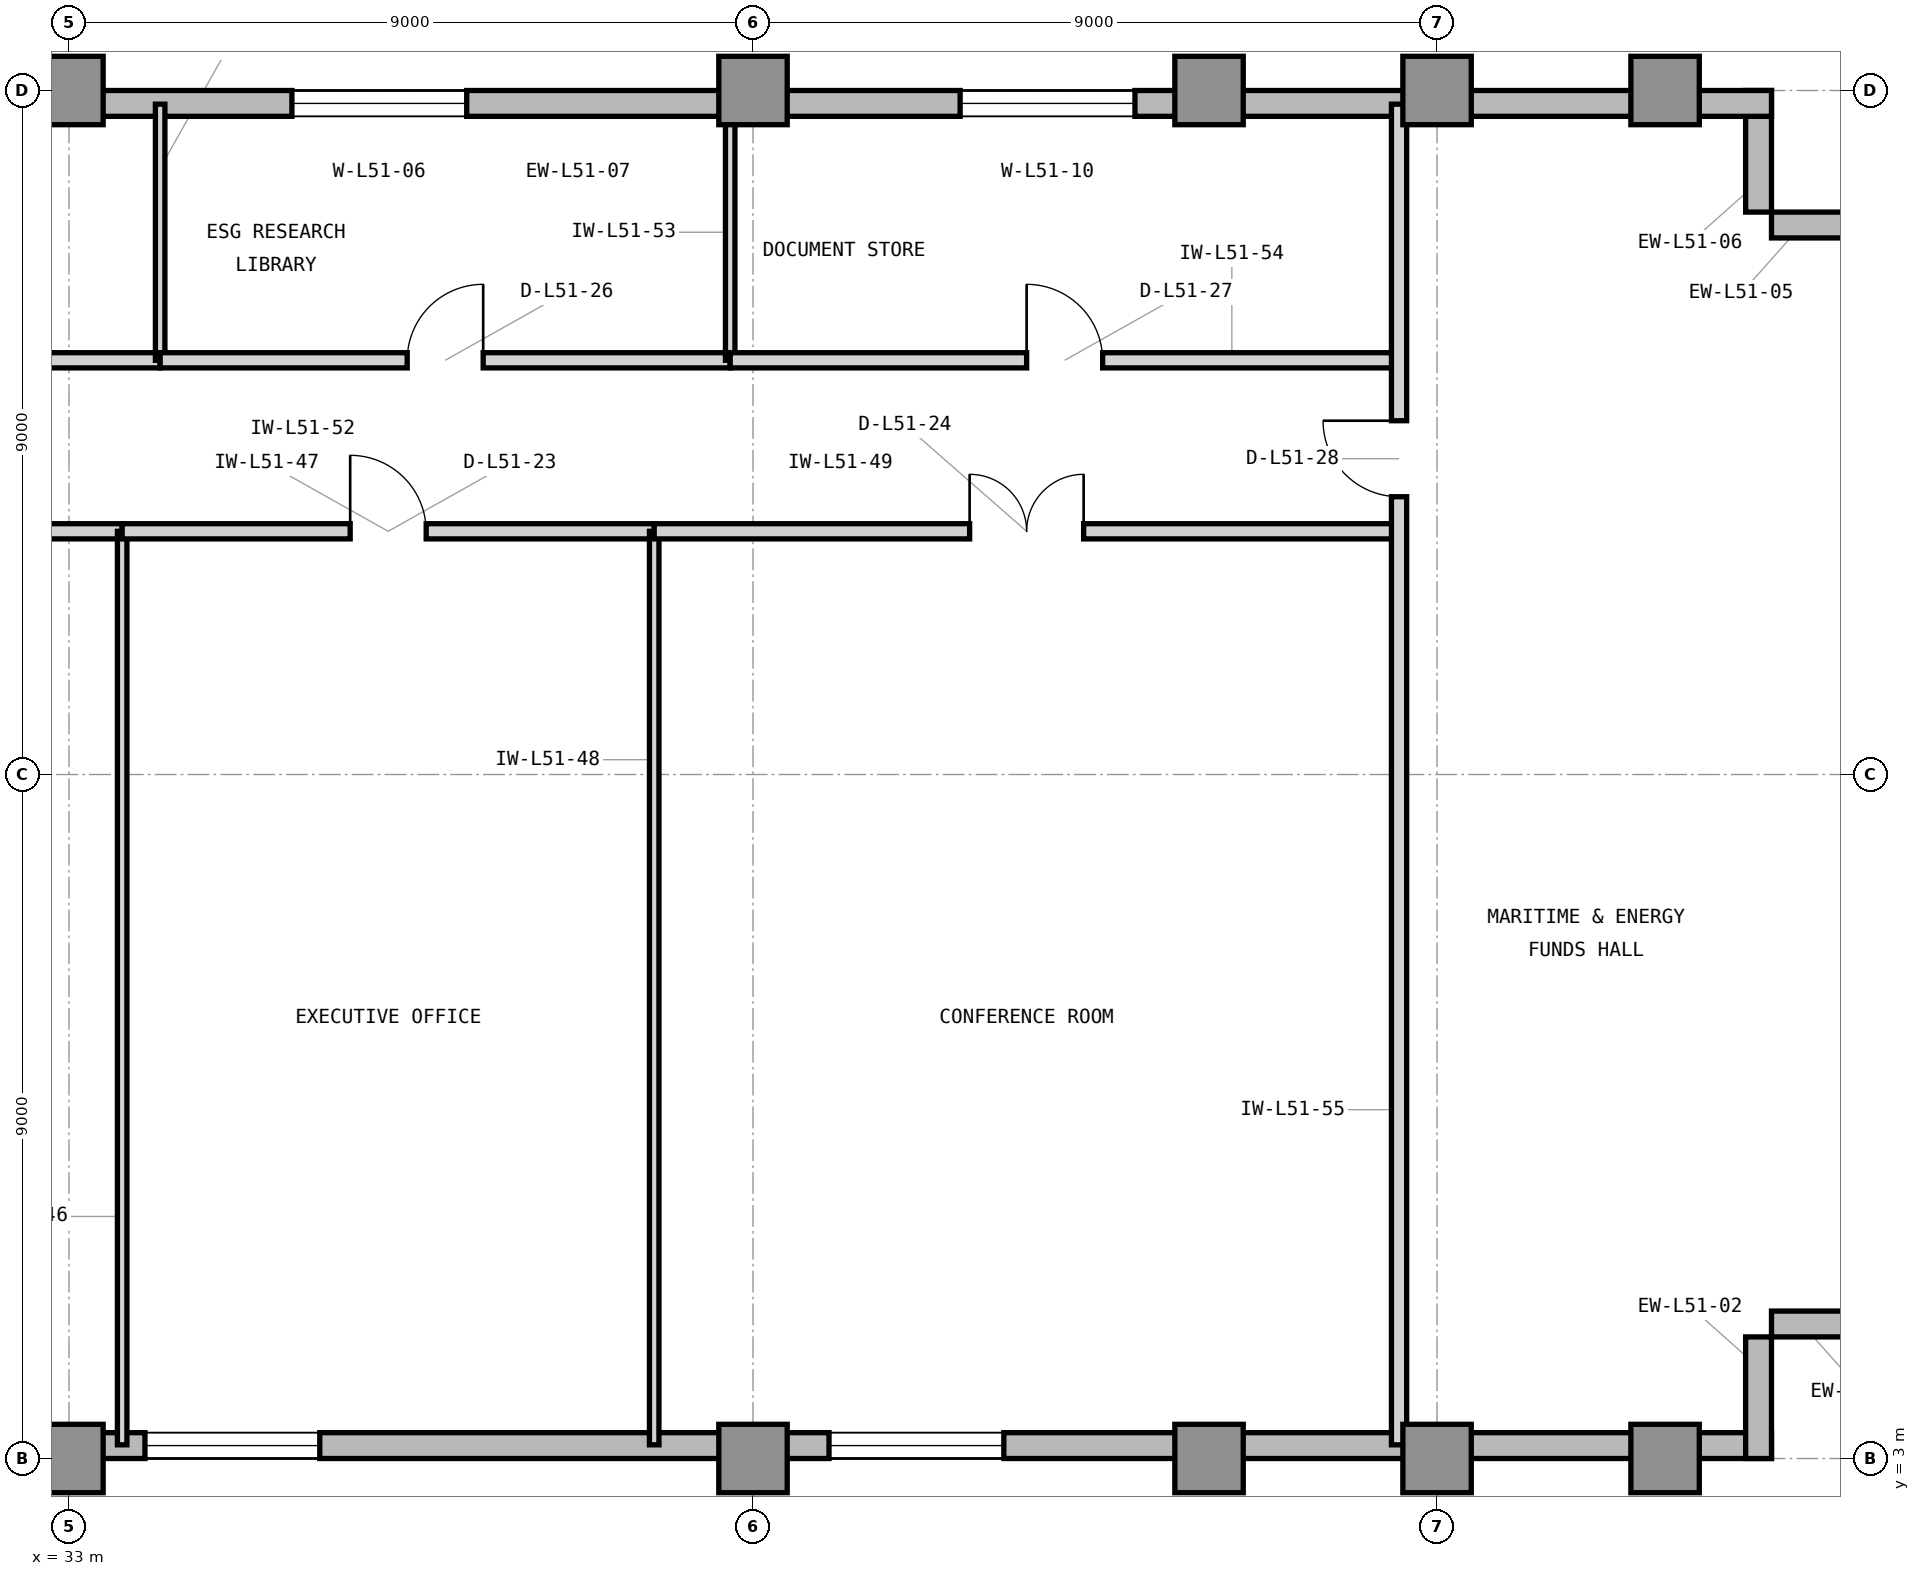
"""IFC4 building model, lengths in metres.
Left out: names, types, materials, properties, quantities, classifications, styles, units other than length and angle.
Written with IfcOpenShell. Run it as: python <this file> out.ifc"""

import sys

from ifc_helpers import new_model, si_unit, direction, frame, frame_2d, origin, origin_2d, place, context, subcontext, project, spatial, rectangle, extrude, element, fill, save


model = new_model("IFC4")
c1 = context("Model", 3, precision=1e-05, world=origin(), true_north=direction((0.0, 1.0)))
c2 = subcontext(c1, "Body", "Model", "MODEL_VIEW")
j1 = project(units=[si_unit("LENGTHUNIT", "METRE"), si_unit("PLANEANGLEUNIT", "RADIAN")], contexts=[c1])
p1 = place(None, origin())
s1 = spatial("IfcSite", under=j1, at=p1, CompositionType="ELEMENT")
p2 = place(p1, origin())
s2 = spatial("IfcBuilding", under=s1, at=p2, CompositionType="ELEMENT")
p3 = place(p2, frame((0.0, 0.0, 211.2)))
s3 = spatial("IfcBuildingStorey", under=s2, at=p3, CompositionType="ELEMENT", Elevation=211.2)
for number, where, z_axis, x_axis in (
    (1, (33.0, 3.0, 0.0), (0.0, 0.0, 1.0), (1.0, 0.0, 0.0)),
    (2, (33.0, 21.0, 0.0), (0.0, 0.0, 1.0), (1.0, 0.0, 0.0)),
    (3, (42.0, 3.0, 0.0), (0.0, 0.0, 1.0), (1.0, 0.0, 0.0)),
    (4, (42.0, 21.0, 0.0), (0.0, 0.0, 1.0), (1.0, 0.0, 0.0)),
    (5, (48.0, 3.0, 0.0), (0.0, 0.0, 1.0), (1.0, 0.0, 0.0)),
    (6, (48.0, 21.0, 0.0), (0.0, 0.0, 1.0), (1.0, 0.0, 0.0)),
    (7, (51.0, 3.0, 0.0), (0.0, 0.0, 1.0), (1.0, 0.0, 0.0)),
    (8, (51.0, 21.0, 0.0), (0.0, 0.0, 1.0), (1.0, 0.0, 0.0)),
    (9, (54.0, 3.0, 0.0), (0.0, 0.0, 1.0), (1.0, 0.0, 0.0)),
    (10, (54.0, 21.0, 0.0), (0.0, 0.0, 1.0), (1.0, 0.0, 0.0)),
):
    element("IfcColumn", number, at=place(p3, frame(where, z_axis=z_axis, x_axis=x_axis)), inside=s3, PredefinedType="COLUMN", context=c2, shape_type="SweptSolid", body=[
        extrude(rectangle(XDim=0.9, YDim=0.9, at=origin_2d()), origin(), (0.0, 0.0, 1.0), 3.9),
    ])
p4 = place(p3, frame((23.9, 3.17, 0.0), z_axis=(0.0, 0.0, 1.0), x_axis=(1.0, 0.0, 0.0)))
e11 = element("IfcWall", 11, at=p4, inside=s3, PredefinedType="STANDARD", context=c2, shape_type="SweptSolid", body=[
    extrude(rectangle(XDim=31.5, YDim=0.34, at=frame_2d((15.75, 0.0))), origin(), (0.0, 0.0, 1.0), 3.7),
])
p5 = place(p4, frame((5.6, 0.0, 0.9)))
e12 = element("IfcOpeningElement", 12, at=p5, cuts=e11, PredefinedType="OPENING", context=c2, shape_type="SweptSolid", body=[
    extrude(rectangle(XDim=2.3, YDim=2.2, at=frame_2d((1.15, 1.1))), frame((0.0, 0.18, 0.0), z_axis=(0.0, -1.0, 0.0), x_axis=(1.0, 0.0, 0.0)), (0.0, 0.0, 1.0), 0.36),
])
p6 = place(p4, frame((10.1, 0.0, 0.9)))
e13 = element("IfcOpeningElement", 13, at=p6, cuts=e11, PredefinedType="OPENING", context=c2, shape_type="SweptSolid", body=[
    extrude(rectangle(XDim=2.3, YDim=2.2, at=frame_2d((1.15, 1.1))), frame((0.0, 0.18, 0.0), z_axis=(0.0, -1.0, 0.0), x_axis=(1.0, 0.0, 0.0)), (0.0, 0.0, 1.0), 0.36),
])
p7 = place(p4, frame((19.1, 0.0, 0.9)))
e14 = element("IfcOpeningElement", 14, at=p7, cuts=e11, PredefinedType="OPENING", context=c2, shape_type="SweptSolid", body=[
    extrude(rectangle(XDim=2.3, YDim=2.2, at=frame_2d((1.15, 1.1))), frame((0.0, 0.18, 0.0), z_axis=(0.0, -1.0, 0.0), x_axis=(1.0, 0.0, 0.0)), (0.0, 0.0, 1.0), 0.36),
])
p8 = place(p4, frame((0.9, 0.0, 0.9)))
e15 = element("IfcOpeningElement", 15, at=p8, cuts=e11, PredefinedType="OPENING", context=c2, shape_type="SweptSolid", body=[
    extrude(rectangle(XDim=1.6, YDim=2.2, at=frame_2d((0.8, 1.1))), frame((0.0, 0.18, 0.0), z_axis=(0.0, -1.0, 0.0), x_axis=(1.0, 0.0, 0.0)), (0.0, 0.0, 1.0), 0.36),
])
for number, where, z_axis, x_axis in (
    (16, (55.23, 3.0, 0.0), (0.0, 0.0, 1.0), (0.0, 1.0, 0.0)),
    (17, (55.4, 4.77, 0.0), (0.0, 0.0, 1.0), (1.0, 0.0, 0.0)),
    (18, (57.0, 19.23, 0.0), (0.0, 0.0, 1.0), (-1.0, 0.0, 0.0)),
    (19, (55.23, 19.4, 0.0), (0.0, 0.0, 1.0), (0.0, 1.0, 0.0)),
):
    element("IfcWall", number, at=place(p3, frame(where, z_axis=z_axis, x_axis=x_axis)), inside=s3, PredefinedType="STANDARD", context=c2, shape_type="SweptSolid", body=[
        extrude(rectangle(XDim=1.6, YDim=0.34, at=frame_2d((0.8, 0.0))), origin(), (0.0, 0.0, 1.0), 3.7),
    ])
p9 = place(p3, frame((55.4, 20.83, 0.0), z_axis=(0.0, 0.0, 1.0), x_axis=(-1.0, 0.0, 0.0)))
e20 = element("IfcWall", 20, at=p9, inside=s3, PredefinedType="STANDARD", context=c2, shape_type="SweptSolid", body=[
    extrude(rectangle(XDim=31.4, YDim=0.34, at=frame_2d((15.7, 0.0))), origin(), (0.0, 0.0, 1.0), 3.7),
])
p10 = place(p9, frame((17.167, 0.0, 0.9)))
e21 = element("IfcOpeningElement", 21, at=p10, cuts=e20, PredefinedType="OPENING", context=c2, shape_type="SweptSolid", body=[
    extrude(rectangle(XDim=2.3, YDim=2.2, at=frame_2d((1.15, 1.1))), frame((0.0, 0.18, 0.0), z_axis=(0.0, -1.0, 0.0), x_axis=(1.0, 0.0, 0.0)), (0.0, 0.0, 1.0), 0.36),
])
p11 = place(p9, frame((23.825, 0.0, 0.9)))
e22 = element("IfcOpeningElement", 22, at=p11, cuts=e20, PredefinedType="OPENING", context=c2, shape_type="SweptSolid", body=[
    extrude(rectangle(XDim=2.3, YDim=2.2, at=frame_2d((1.15, 1.1))), frame((0.0, 0.18, 0.0), z_axis=(0.0, -1.0, 0.0), x_axis=(1.0, 0.0, 0.0)), (0.0, 0.0, 1.0), 0.36),
])
p12 = place(p9, frame((8.375, 0.0, 0.9)))
e23 = element("IfcOpeningElement", 23, at=p12, cuts=e20, PredefinedType="OPENING", context=c2, shape_type="SweptSolid", body=[
    extrude(rectangle(XDim=2.3, YDim=2.2, at=frame_2d((1.15, 1.1))), frame((0.0, 0.18, 0.0), z_axis=(0.0, -1.0, 0.0), x_axis=(1.0, 0.0, 0.0)), (0.0, 0.0, 1.0), 0.36),
])
p13 = place(p3, frame((26.7, 15.2, 0.0), z_axis=(0.0, 0.0, 1.0), x_axis=(1.0, 0.0, 0.0)))
e24 = element("IfcWall", 24, at=p13, inside=s3, PredefinedType="PARTITIONING", context=c2, shape_type="SweptSolid", body=[
    extrude(rectangle(XDim=7.0, YDim=0.2, at=frame_2d((3.5, 0.0))), origin(), (0.0, 0.0, 1.0), 3.69),
])
p14 = place(p13, frame((2.5, 0.0, 0.0)))
e25 = element("IfcOpeningElement", 25, at=p14, cuts=e24, PredefinedType="OPENING", context=c2, shape_type="SweptSolid", body=[
    extrude(rectangle(XDim=2.0, YDim=2.5, at=frame_2d((1.0, 1.25))), frame((0.0, 0.11, 0.0), z_axis=(0.0, -1.0, 0.0), x_axis=(1.0, 0.0, 0.0)), (0.0, 0.0, 1.0), 0.22),
])
p15 = place(p3, frame((33.7, 3.18, 0.0), z_axis=(0.0, 0.0, 1.0), x_axis=(0.0, 1.0, 0.0)))
e26 = element("IfcWall", 26, at=p15, inside=s3, PredefinedType="PARTITIONING", context=c2, shape_type="SweptSolid", body=[
    extrude(rectangle(XDim=12.02, YDim=0.125, at=frame_2d((6.01, 0.0))), origin(), (0.0, 0.0, 1.0), 3.69),
])
p16 = place(p3, frame((33.7, 15.2, 0.0), z_axis=(0.0, 0.0, 1.0), x_axis=(1.0, 0.0, 0.0)))
e27 = element("IfcWall", 27, at=p16, inside=s3, PredefinedType="PARTITIONING", context=c2, shape_type="SweptSolid", body=[
    extrude(rectangle(XDim=7.0, YDim=0.2, at=frame_2d((3.5, 0.0))), origin(), (0.0, 0.0, 1.0), 3.69),
])
p17 = place(p16, frame((3.0, 0.0, 0.0)))
e28 = element("IfcOpeningElement", 28, at=p17, cuts=e27, PredefinedType="OPENING", context=c2, shape_type="SweptSolid", body=[
    extrude(rectangle(XDim=1.0, YDim=2.15, at=frame_2d((0.5, 1.075))), frame((0.0, 0.11, 0.0), z_axis=(0.0, -1.0, 0.0), x_axis=(1.0, 0.0, 0.0)), (0.0, 0.0, 1.0), 0.22),
])
p18 = place(p3, frame((40.7, 3.18, 0.0), z_axis=(0.0, 0.0, 1.0), x_axis=(0.0, 1.0, 0.0)))
e29 = element("IfcWall", 29, at=p18, inside=s3, PredefinedType="PARTITIONING", context=c2, shape_type="SweptSolid", body=[
    extrude(rectangle(XDim=12.02, YDim=0.125, at=frame_2d((6.01, 0.0))), origin(), (0.0, 0.0, 1.0), 3.69),
])
p19 = place(p3, frame((40.7, 15.2, 0.0), z_axis=(0.0, 0.0, 1.0), x_axis=(1.0, 0.0, 0.0)))
e30 = element("IfcWall", 30, at=p19, inside=s3, PredefinedType="PARTITIONING", context=c2, shape_type="SweptSolid", body=[
    extrude(rectangle(XDim=9.8, YDim=0.2, at=frame_2d((4.9, 0.0))), origin(), (0.0, 0.0, 1.0), 3.69),
])
p20 = place(p19, frame((4.15, 0.0, 0.0)))
e31 = element("IfcOpeningElement", 31, at=p20, cuts=e30, PredefinedType="OPENING", context=c2, shape_type="SweptSolid", body=[
    extrude(rectangle(XDim=1.5, YDim=2.3, at=frame_2d((0.75, 1.15))), frame((0.0, 0.11, 0.0), z_axis=(0.0, -1.0, 0.0), x_axis=(1.0, 0.0, 0.0)), (0.0, 0.0, 1.0), 0.22),
])
p21 = place(p3, frame((26.7, 17.45, 0.0), z_axis=(0.0, 0.0, 1.0), x_axis=(1.0, 0.0, 0.0)))
e32 = element("IfcWall", 32, at=p21, inside=s3, PredefinedType="PARTITIONING", context=c2, shape_type="SweptSolid", body=[
    extrude(rectangle(XDim=7.5, YDim=0.2, at=frame_2d((3.75, 0.0))), origin(), (0.0, 0.0, 1.0), 3.69),
])
p22 = place(p21, frame((3.0, 0.0, 0.0)))
e33 = element("IfcOpeningElement", 33, at=p22, cuts=e32, PredefinedType="OPENING", context=c2, shape_type="SweptSolid", body=[
    extrude(rectangle(XDim=1.5, YDim=2.3, at=frame_2d((0.75, 1.15))), frame((0.0, 0.11, 0.0), z_axis=(0.0, -1.0, 0.0), x_axis=(1.0, 0.0, 0.0)), (0.0, 0.0, 1.0), 0.22),
])
p23 = place(p3, frame((34.2, 17.45, 0.0), z_axis=(0.0, 0.0, 1.0), x_axis=(0.0, 1.0, 0.0)))
e34 = element("IfcWall", 34, at=p23, inside=s3, PredefinedType="PARTITIONING", context=c2, shape_type="SweptSolid", body=[
    extrude(rectangle(XDim=3.37, YDim=0.125, at=frame_2d((1.685, 0.0))), origin(), (0.0, 0.0, 1.0), 3.69),
])
p24 = place(p3, frame((34.2, 17.45, 0.0), z_axis=(0.0, 0.0, 1.0), x_axis=(1.0, 0.0, 0.0)))
e35 = element("IfcWall", 35, at=p24, inside=s3, PredefinedType="PARTITIONING", context=c2, shape_type="SweptSolid", body=[
    extrude(rectangle(XDim=7.5, YDim=0.2, at=frame_2d((3.75, 0.0))), origin(), (0.0, 0.0, 1.0), 3.69),
])
p25 = place(p24, frame((3.25, 0.0, 0.0)))
e36 = element("IfcOpeningElement", 36, at=p25, cuts=e35, PredefinedType="OPENING", context=c2, shape_type="SweptSolid", body=[
    extrude(rectangle(XDim=1.0, YDim=2.15, at=frame_2d((0.5, 1.075))), frame((0.0, 0.11, 0.0), z_axis=(0.0, -1.0, 0.0), x_axis=(1.0, 0.0, 0.0)), (0.0, 0.0, 1.0), 0.22),
])
p26 = place(p3, frame((41.7, 17.45, 0.0), z_axis=(0.0, 0.0, 1.0), x_axis=(0.0, 1.0, 0.0)))
e37 = element("IfcWall", 37, at=p26, inside=s3, PredefinedType="PARTITIONING", context=c2, shape_type="SweptSolid", body=[
    extrude(rectangle(XDim=3.37, YDim=0.125, at=frame_2d((1.685, 0.0))), origin(), (0.0, 0.0, 1.0), 3.69),
])
p27 = place(p3, frame((41.7, 17.45, 0.0), z_axis=(0.0, 0.0, 1.0), x_axis=(1.0, 0.0, 0.0)))
e38 = element("IfcWall", 38, at=p27, inside=s3, PredefinedType="PARTITIONING", context=c2, shape_type="SweptSolid", body=[
    extrude(rectangle(XDim=8.8, YDim=0.2, at=frame_2d((4.4, 0.0))), origin(), (0.0, 0.0, 1.0), 3.69),
])
p28 = place(p27, frame((3.9, 0.0, 0.0)))
e39 = element("IfcOpeningElement", 39, at=p28, cuts=e38, PredefinedType="OPENING", context=c2, shape_type="SweptSolid", body=[
    extrude(rectangle(XDim=1.0, YDim=2.15, at=frame_2d((0.5, 1.075))), frame((0.0, 0.11, 0.0), z_axis=(0.0, -1.0, 0.0), x_axis=(1.0, 0.0, 0.0)), (0.0, 0.0, 1.0), 0.22),
])
p29 = place(p3, frame((50.5, 3.18, 0.0), z_axis=(0.0, 0.0, 1.0), x_axis=(0.0, 1.0, 0.0)))
e40 = element("IfcWall", 40, at=p29, inside=s3, PredefinedType="PARTITIONING", context=c2, shape_type="SweptSolid", body=[
    extrude(rectangle(XDim=17.64, YDim=0.2, at=frame_2d((8.82, 0.0))), origin(), (0.0, 0.0, 1.0), 3.69),
])
p30 = place(p29, frame((12.475, 0.0, 0.0)))
e41 = element("IfcOpeningElement", 41, at=p30, cuts=e40, PredefinedType="OPENING", context=c2, shape_type="SweptSolid", body=[
    extrude(rectangle(XDim=1.0, YDim=2.15, at=frame_2d((0.5, 1.075))), frame((0.0, 0.11, 0.0), z_axis=(0.0, -1.0, 0.0), x_axis=(1.0, 0.0, 0.0)), (0.0, 0.0, 1.0), 0.22),
])
p31 = place(p6, origin())
e42 = element("IfcWindow", 42, at=p31, inside=s3, PartitioningType="SINGLE_PANEL", PredefinedType="WINDOW", context=c2, shape_type="SweptSolid", body=[
    extrude(rectangle(XDim=2.3, YDim=2.2, at=frame_2d((1.15, 1.1))), frame((0.0, 0.11, 0.0), z_axis=(0.0, -1.0, 0.0), x_axis=(1.0, 0.0, 0.0)), (0.0, 0.0, 1.0), 0.06),
])
fill(e13, e42)
p32 = place(p7, origin())
e43 = element("IfcWindow", 43, at=p32, inside=s3, PartitioningType="SINGLE_PANEL", PredefinedType="WINDOW", context=c2, shape_type="SweptSolid", body=[
    extrude(rectangle(XDim=2.3, YDim=2.2, at=frame_2d((1.15, 1.1))), frame((0.0, 0.11, 0.0), z_axis=(0.0, -1.0, 0.0), x_axis=(1.0, 0.0, 0.0)), (0.0, 0.0, 1.0), 0.06),
])
fill(e14, e43)
p33 = place(p10, origin())
e44 = element("IfcWindow", 44, at=p33, inside=s3, PartitioningType="SINGLE_PANEL", PredefinedType="WINDOW", context=c2, shape_type="SweptSolid", body=[
    extrude(rectangle(XDim=2.3, YDim=2.2, at=frame_2d((1.15, 1.1))), frame((0.0, 0.11, 0.0), z_axis=(0.0, -1.0, 0.0), x_axis=(1.0, 0.0, 0.0)), (0.0, 0.0, 1.0), 0.06),
])
fill(e21, e44)
p34 = place(p17, origin())
e45 = element("IfcDoor", 45, at=p34, inside=s3, OperationType="SINGLE_SWING_LEFT", PredefinedType="DOOR", context=c2, shape_type="SweptSolid", body=[
    extrude(rectangle(XDim=1.0, YDim=2.15, at=frame_2d((0.5, 1.075))), frame((0.0, 0.025, 0.0), z_axis=(0.0, -1.0, 0.0), x_axis=(1.0, 0.0, 0.0)), (0.0, 0.0, 1.0), 0.05),
])
fill(e28, e45)
p35 = place(p20, origin())
e46 = element("IfcDoor", 46, at=p35, inside=s3, OperationType="DOUBLE_DOOR_SINGLE_SWING", PredefinedType="DOOR", context=c2, shape_type="SweptSolid", body=[
    extrude(rectangle(XDim=1.5, YDim=2.3, at=frame_2d((0.75, 1.15))), frame((0.0, 0.025, 0.0), z_axis=(0.0, -1.0, 0.0), x_axis=(1.0, 0.0, 0.0)), (0.0, 0.0, 1.0), 0.05),
])
fill(e31, e46)
p36 = place(p25, origin())
e47 = element("IfcDoor", 47, at=p36, inside=s3, OperationType="SINGLE_SWING_RIGHT", PredefinedType="DOOR", context=c2, shape_type="SweptSolid", body=[
    extrude(rectangle(XDim=1.0, YDim=2.15, at=frame_2d((0.5, 1.075))), frame((0.0, 0.025, 0.0), z_axis=(0.0, -1.0, 0.0), x_axis=(1.0, 0.0, 0.0)), (0.0, 0.0, 1.0), 0.05),
])
fill(e36, e47)
p37 = place(p28, origin())
e48 = element("IfcDoor", 48, at=p37, inside=s3, OperationType="SINGLE_SWING_LEFT", PredefinedType="DOOR", context=c2, shape_type="SweptSolid", body=[
    extrude(rectangle(XDim=1.0, YDim=2.15, at=frame_2d((0.5, 1.075))), frame((0.0, 0.025, 0.0), z_axis=(0.0, -1.0, 0.0), x_axis=(1.0, 0.0, 0.0)), (0.0, 0.0, 1.0), 0.05),
])
fill(e39, e48)
p38 = place(p30, origin())
e49 = element("IfcDoor", 49, at=p38, inside=s3, OperationType="SINGLE_SWING_RIGHT", PredefinedType="DOOR", context=c2, shape_type="SweptSolid", body=[
    extrude(rectangle(XDim=1.0, YDim=2.15, at=frame_2d((0.5, 1.075))), frame((0.0, 0.025, 0.0), z_axis=(0.0, -1.0, 0.0), x_axis=(1.0, 0.0, 0.0)), (0.0, 0.0, 1.0), 0.05),
])
fill(e41, e49)
p39 = place(p12, origin())
e50 = element("IfcWindow", 50, at=p39, inside=s3, PartitioningType="SINGLE_PANEL", PredefinedType="WINDOW", context=c2, shape_type="SweptSolid", body=[
    extrude(rectangle(XDim=2.3, YDim=2.2, at=frame_2d((1.15, 1.1))), frame((0.0, 0.11, 0.0), z_axis=(0.0, -1.0, 0.0), x_axis=(1.0, 0.0, 0.0)), (0.0, 0.0, 1.0), 0.06),
])
fill(e23, e50)
save(model, sys.argv[1])
